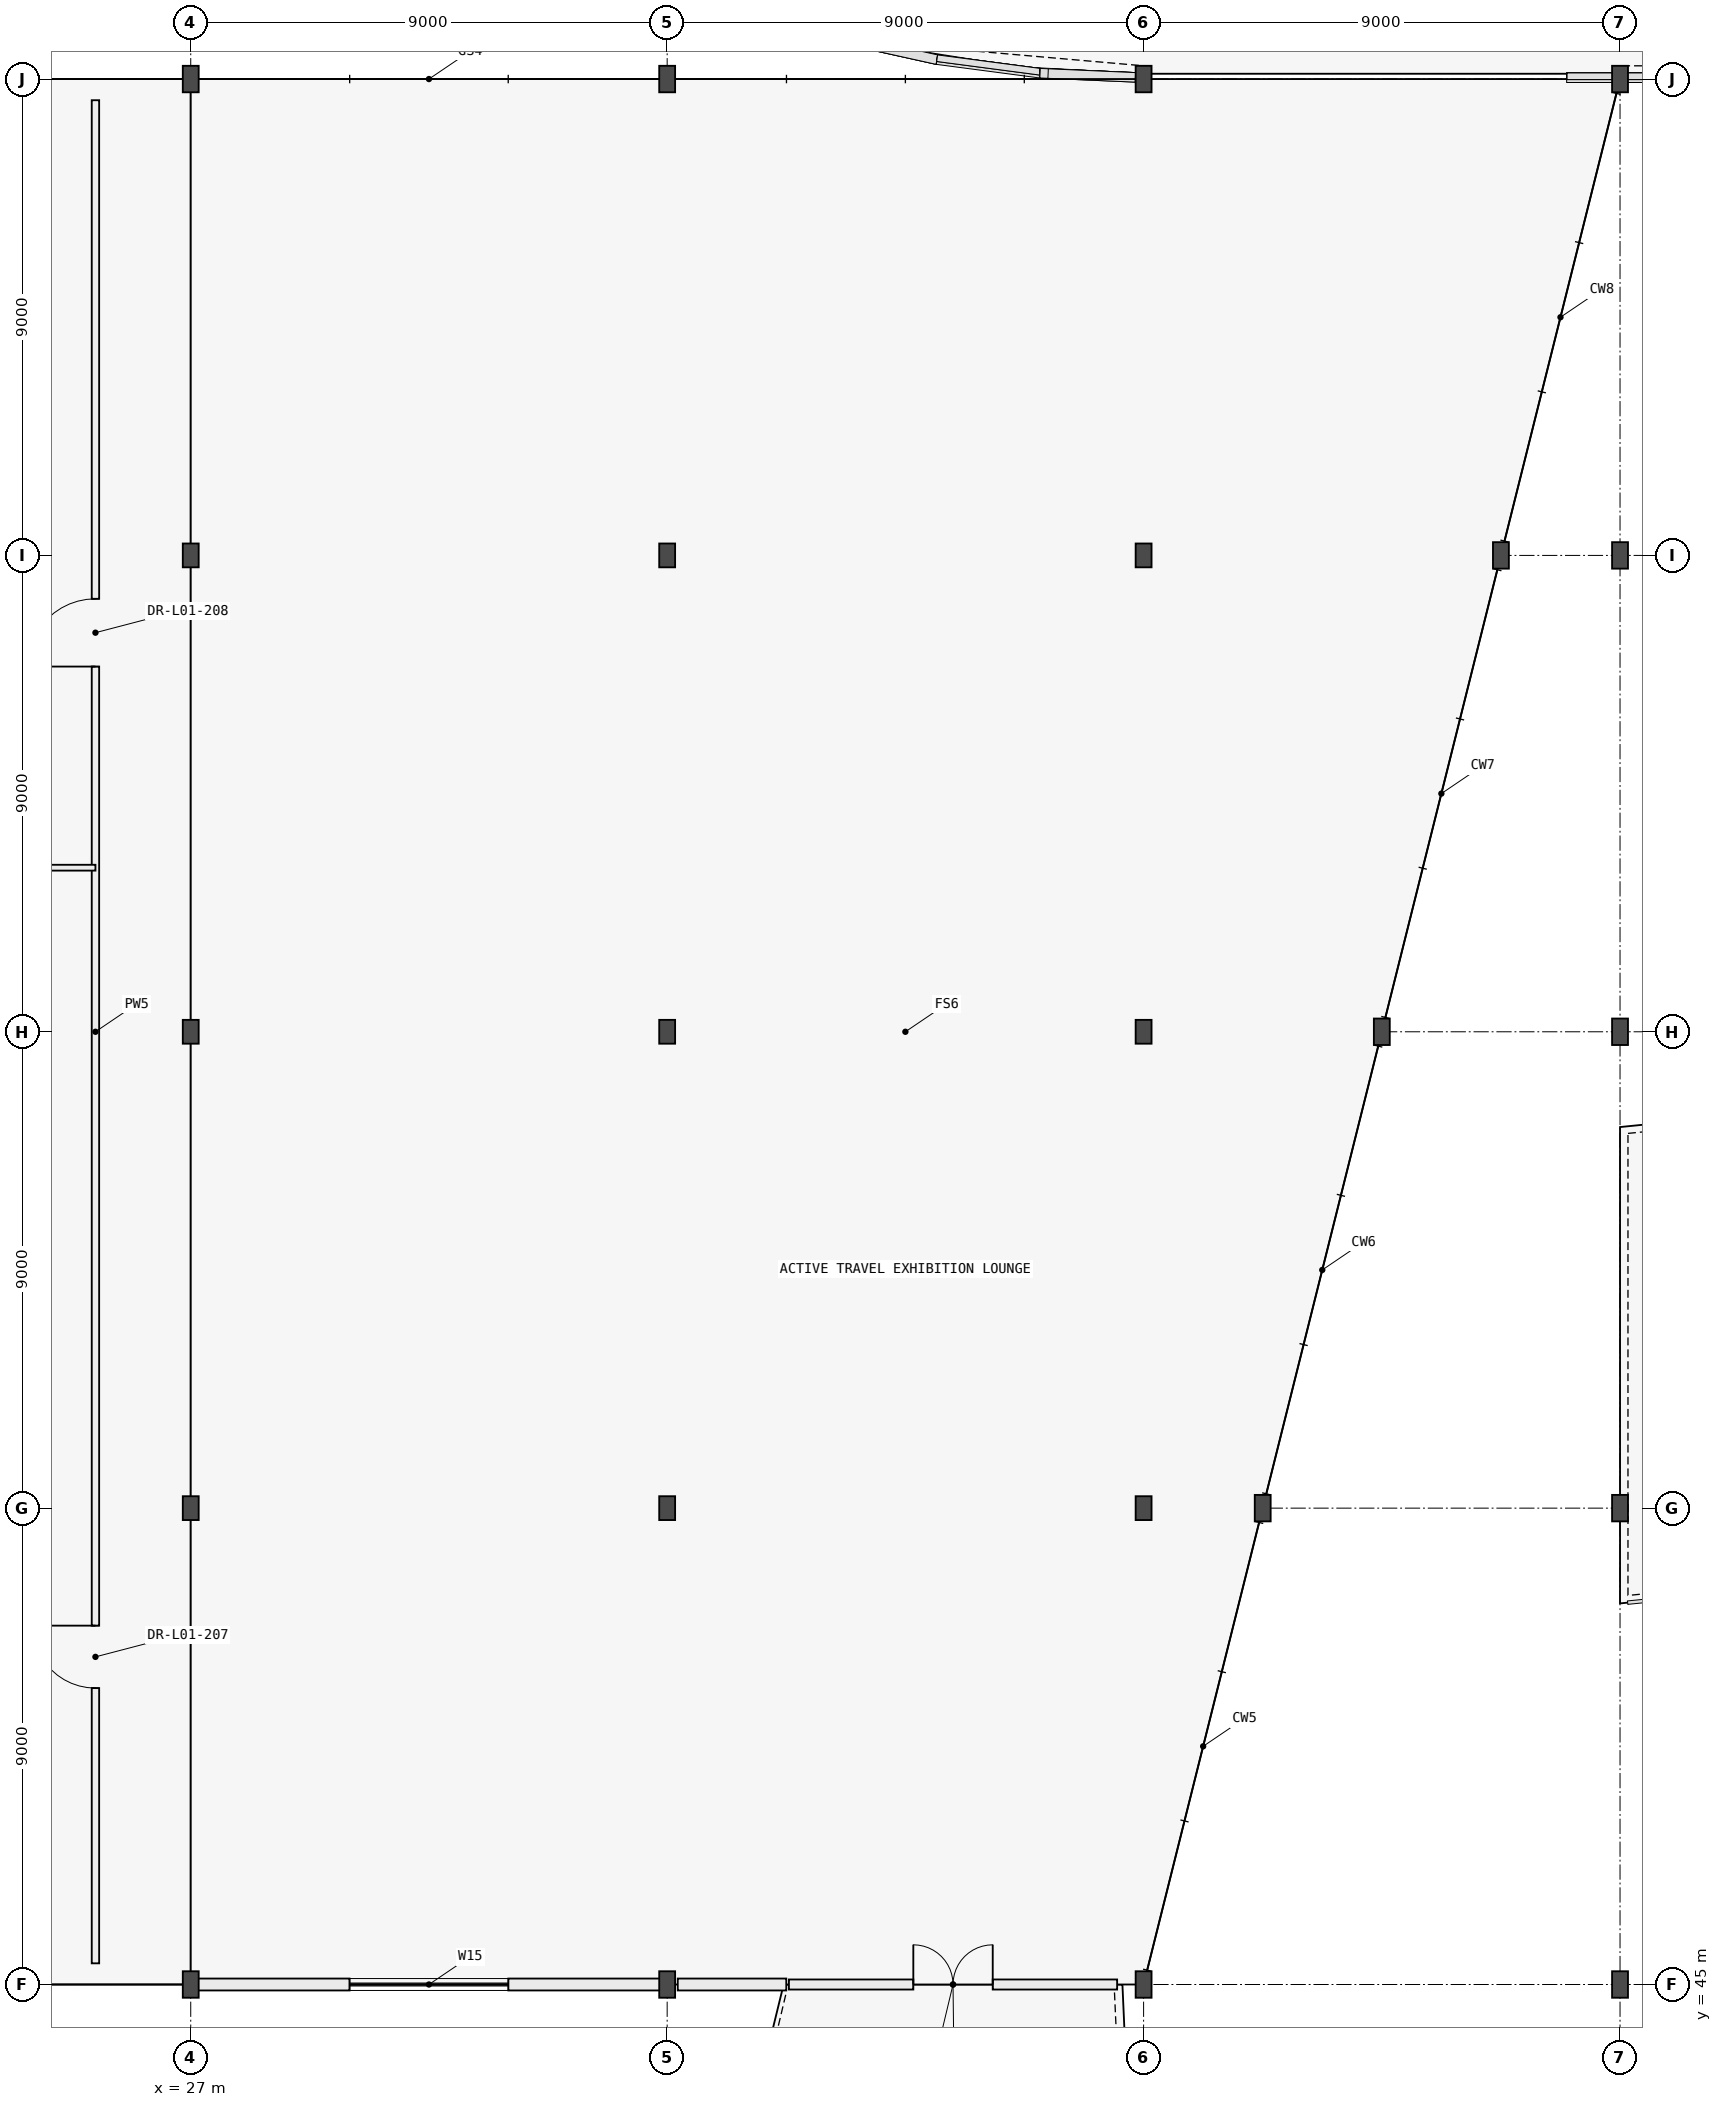
"""IFC4 building model, lengths in metres.
Left out: names, types, materials, properties, quantities, classifications, styles, units other than length and angle.
Written with IfcOpenShell. Run it as: python <this file> out.ifc"""

import sys

from ifc_helpers import new_model, si_unit, direction, frame, frame_2d, origin, origin_2d, place, context, subcontext, project, spatial, rectangle, i_section, extrude, element, fill, save


model = new_model("IFC4")
c1 = context("Model", 3, precision=1e-05, world=origin(), true_north=direction((0.0, 1.0)))
c2 = subcontext(c1, "Body", "Model", "MODEL_VIEW")
j1 = project(units=[si_unit("LENGTHUNIT", "METRE"), si_unit("PLANEANGLEUNIT", "RADIAN")], contexts=[c1])
p1 = place(None, origin())
s1 = spatial("IfcSite", under=j1, at=p1, CompositionType="ELEMENT")
p2 = place(p1, origin())
s2 = spatial("IfcBuilding", under=s1, at=p2, CompositionType="ELEMENT")
p3 = place(p2, frame((0.0, 0.0, 4.2)))
s3 = spatial("IfcBuildingStorey", under=s2, at=p3, CompositionType="ELEMENT", Elevation=4.2)
for number, where, z_axis, x_axis in (
    (1, (27.0, 45.0, 0.0), (0.0, 0.0, 1.0), (1.0, 0.0, 0.0)),
    (2, (36.0, 45.0, 0.0), (0.0, 0.0, 1.0), (1.0, 0.0, 0.0)),
    (3, (45.0, 45.0, 0.0), (0.0, 0.0, 1.0), (1.0, 0.0, 0.0)),
):
    element("IfcColumn", number, at=place(p3, frame(where, z_axis=z_axis, x_axis=x_axis)), inside=s3, PredefinedType="COLUMN", context=c2, shape_type="SweptSolid", body=[
        extrude(i_section(OverallWidth=0.3, OverallDepth=0.5, WebThickness=0.014, FlangeThickness=0.028, FilletRadius=0.027, at=origin_2d()), origin(), (0.0, 0.0, 1.0), 4.2),
    ])
for number, where, z_axis, x_axis in (
    (4, (27.0, 54.0, 0.0), (0.0, 0.0, 1.0), (1.0, 0.0, 0.0)),
    (5, (36.0, 54.0, 0.0), (0.0, 0.0, 1.0), (1.0, 0.0, 0.0)),
    (6, (45.0, 54.0, 0.0), (0.0, 0.0, 1.0), (1.0, 0.0, 0.0)),
):
    element("IfcColumn", number, at=place(p3, frame(where, z_axis=z_axis, x_axis=x_axis)), inside=s3, PredefinedType="COLUMN", context=c2, shape_type="SweptSolid", body=[
        extrude(i_section(OverallWidth=0.3, OverallDepth=0.45, WebThickness=0.014, FlangeThickness=0.026, FilletRadius=0.027, at=origin_2d()), origin(), (0.0, 0.0, 1.0), 4.2),
    ])
p4 = place(p3, frame((47.25, 54.0, 0.0), z_axis=(0.0, 0.0, 1.0), x_axis=(1.0, 0.0, 0.0)))
e7 = element("IfcColumn", 7, at=p4, inside=s3, PredefinedType="COLUMN", context=c2, shape_type="SweptSolid", body=[
    extrude(i_section(OverallWidth=0.3, OverallDepth=0.5, WebThickness=0.014, FlangeThickness=0.028, FilletRadius=0.027, at=origin_2d()), origin(), (0.0, 0.0, 1.0), 4.2),
])
for number, where, z_axis, x_axis in (
    (8, (27.0, 63.0, 0.0), (0.0, 0.0, 1.0), (1.0, 0.0, 0.0)),
    (9, (36.0, 63.0, 0.0), (0.0, 0.0, 1.0), (1.0, 0.0, 0.0)),
    (10, (45.0, 63.0, 0.0), (0.0, 0.0, 1.0), (1.0, 0.0, 0.0)),
):
    element("IfcColumn", number, at=place(p3, frame(where, z_axis=z_axis, x_axis=x_axis)), inside=s3, PredefinedType="COLUMN", context=c2, shape_type="SweptSolid", body=[
        extrude(i_section(OverallWidth=0.3, OverallDepth=0.45, WebThickness=0.014, FlangeThickness=0.026, FilletRadius=0.027, at=origin_2d()), origin(), (0.0, 0.0, 1.0), 4.2),
    ])
p5 = place(p3, frame((49.5, 63.0, 0.0), z_axis=(0.0, 0.0, 1.0), x_axis=(1.0, 0.0, 0.0)))
e11 = element("IfcColumn", 11, at=p5, inside=s3, PredefinedType="COLUMN", context=c2, shape_type="SweptSolid", body=[
    extrude(i_section(OverallWidth=0.3, OverallDepth=0.5, WebThickness=0.014, FlangeThickness=0.028, FilletRadius=0.027, at=origin_2d()), origin(), (0.0, 0.0, 1.0), 4.2),
])
for number, where, z_axis, x_axis in (
    (12, (27.0, 72.0, 0.0), (0.0, 0.0, 1.0), (1.0, 0.0, 0.0)),
    (13, (36.0, 72.0, 0.0), (0.0, 0.0, 1.0), (1.0, 0.0, 0.0)),
    (14, (45.0, 72.0, 0.0), (0.0, 0.0, 1.0), (1.0, 0.0, 0.0)),
):
    element("IfcColumn", number, at=place(p3, frame(where, z_axis=z_axis, x_axis=x_axis)), inside=s3, PredefinedType="COLUMN", context=c2, shape_type="SweptSolid", body=[
        extrude(i_section(OverallWidth=0.3, OverallDepth=0.45, WebThickness=0.014, FlangeThickness=0.026, FilletRadius=0.027, at=origin_2d()), origin(), (0.0, 0.0, 1.0), 4.2),
    ])
for number, where, z_axis, x_axis in (
    (15, (51.75, 72.0, 0.0), (0.0, 0.0, 1.0), (1.0, 0.0, 0.0)),
    (16, (27.0, 81.0, 0.0), (0.0, 0.0, 1.0), (1.0, 0.0, 0.0)),
    (17, (36.0, 81.0, 0.0), (0.0, 0.0, 1.0), (1.0, 0.0, 0.0)),
    (18, (45.0, 81.0, 0.0), (0.0, 0.0, 1.0), (1.0, 0.0, 0.0)),
    (19, (54.0, 81.0, 0.0), (0.0, 0.0, 1.0), (1.0, 0.0, 0.0)),
    (20, (54.0, 54.0, 0.0), (0.0, 0.0, 1.0), (1.0, 0.0, 0.0)),
    (21, (54.0, 63.0, 0.0), (0.0, 0.0, 1.0), (1.0, 0.0, 0.0)),
    (22, (54.0, 45.0, 0.0), (0.0, 0.0, 1.0), (1.0, 0.0, 0.0)),
    (23, (54.0, 72.0, 0.0), (0.0, 0.0, 1.0), (1.0, 0.0, 0.0)),
):
    element("IfcColumn", number, at=place(p3, frame(where, z_axis=z_axis, x_axis=x_axis)), inside=s3, PredefinedType="COLUMN", context=c2, shape_type="SweptSolid", body=[
        extrude(i_section(OverallWidth=0.3, OverallDepth=0.5, WebThickness=0.014, FlangeThickness=0.028, FilletRadius=0.027, at=origin_2d()), origin(), (0.0, 0.0, 1.0), 4.2),
    ])
p6 = place(p3, frame((27.007, 45.0, 0.0), z_axis=(0.0, 0.0, 1.0), x_axis=(1.0, 0.0, 0.0)))
e24 = element("IfcWall", 24, at=p6, inside=s3, PredefinedType="STANDARD", context=c2, shape_type="SweptSolid", body=[
    extrude(rectangle(XDim=8.986, YDim=0.225, at=frame_2d((4.493, 0.0))), origin(), (0.0, 0.0, 1.0), 3.945),
])
p7 = place(p6, frame((2.993, 0.0, 0.95)))
e25 = element("IfcOpeningElement", 25, at=p7, cuts=e24, PredefinedType="OPENING", context=c2, shape_type="SweptSolid", body=[
    extrude(rectangle(XDim=3.0, YDim=1.8, at=frame_2d((1.5, 0.9))), frame((0.0, 0.123, 0.0), z_axis=(0.0, -1.0, 0.0), x_axis=(1.0, 0.0, 0.0)), (0.0, 0.0, 1.0), 0.245),
])
p8 = place(p3, frame((36.2, 45.0, 0.0), z_axis=(0.0, 0.0, 1.0), x_axis=(1.0, 0.0, 0.0)))
e26 = element("IfcWall", 26, at=p8, inside=s3, PredefinedType="STANDARD", context=c2, shape_type="SweptSolid", body=[
    extrude(rectangle(XDim=2.05, YDim=0.225, at=frame_2d((1.025, 0.0))), origin(), (0.0, 0.0, 1.0), 3.945),
])
p9 = place(p3, frame((25.2, 45.4, 0.0), z_axis=(0.0, 0.0, 1.0), x_axis=(0.0, 1.0, 0.0)))
e27 = element("IfcWall", 27, at=p9, inside=s3, PredefinedType="PARTITIONING", context=c2, shape_type="SweptSolid", body=[
    extrude(rectangle(XDim=35.2, YDim=0.14, at=frame_2d((17.6, 0.0))), origin(), (0.0, 0.0, 1.0), 3.945),
])
p10 = place(p9, frame((5.2, 0.0, 0.0)))
e28 = element("IfcOpeningElement", 28, at=p10, cuts=e27, PredefinedType="OPENING", context=c2, shape_type="SweptSolid", body=[
    extrude(rectangle(XDim=1.18, YDim=2.15, at=frame_2d((0.59, 1.075))), frame((0.0, 0.08, 0.0), z_axis=(0.0, -1.0, 0.0), x_axis=(1.0, 0.0, 0.0)), (0.0, 0.0, 1.0), 0.16),
])
p11 = place(p9, frame((24.5, 0.0, 0.0)))
e29 = element("IfcOpeningElement", 29, at=p11, cuts=e27, PredefinedType="OPENING", context=c2, shape_type="SweptSolid", body=[
    extrude(rectangle(XDim=1.28, YDim=2.18, at=frame_2d((0.64, 1.09))), frame((0.0, 0.08, 0.0), z_axis=(0.0, -1.0, 0.0), x_axis=(1.0, 0.0, 0.0)), (0.0, 0.0, 1.0), 0.16),
])
p12 = place(p3, frame((0.4, 66.1, 0.0), z_axis=(0.0, 0.0, 1.0), x_axis=(1.0, 0.0, 0.0)))
e30 = element("IfcWall", 30, at=p12, inside=s3, PredefinedType="PARTITIONING", context=c2, shape_type="SweptSolid", body=[
    extrude(rectangle(XDim=24.8, YDim=0.11, at=frame_2d((12.4, 0.0))), origin(), (0.0, 0.0, 1.0), 3.945),
])
p13 = place(p12, frame((5.8, 0.0, 0.0)))
e31 = element("IfcOpeningElement", 31, at=p13, cuts=e30, PredefinedType="OPENING", context=c2, shape_type="SweptSolid", body=[
    extrude(rectangle(XDim=1.38, YDim=2.2, at=frame_2d((0.69, 1.1))), frame((0.0, 0.065, 0.0), z_axis=(0.0, -1.0, 0.0), x_axis=(1.0, 0.0, 0.0)), (0.0, 0.0, 1.0), 0.13),
])
p14 = place(p3, frame((38.3, 45.0, 0.0), z_axis=(0.0, 0.0, 1.0), x_axis=(1.0, 0.0, 0.0)))
e32 = element("IfcWall", 32, at=p14, inside=s3, PredefinedType="PARTITIONING", context=c2, shape_type="SweptSolid", body=[
    extrude(rectangle(XDim=6.2, YDim=0.19, at=frame_2d((3.1, 0.0))), origin(), (0.0, 0.0, 1.0), 3.945),
])
p15 = place(p14, frame((2.35, 0.0, 0.0)))
e33 = element("IfcOpeningElement", 33, at=p15, cuts=e32, PredefinedType="OPENING", context=c2, shape_type="SweptSolid", body=[
    extrude(rectangle(XDim=1.5, YDim=2.2, at=frame_2d((0.75, 1.1))), frame((0.0, 0.105, 0.0), z_axis=(0.0, -1.0, 0.0), x_axis=(1.0, 0.0, 0.0)), (0.0, 0.0, 1.0), 0.21),
])
p16 = place(p7, origin())
e34 = element("IfcWindow", 34, at=p16, inside=s3, PartitioningType="SINGLE_PANEL", PredefinedType="WINDOW", context=c2, shape_type="SweptSolid", body=[
    extrude(rectangle(XDim=3.0, YDim=1.8, at=frame_2d((1.5, 0.9))), frame((0.0, 0.03, 0.0), z_axis=(0.0, -1.0, 0.0), x_axis=(1.0, 0.0, 0.0)), (0.0, 0.0, 1.0), 0.06),
])
fill(e25, e34)
p17 = place(p10, origin())
e35 = element("IfcDoor", 35, at=p17, inside=s3, OperationType="SINGLE_SWING_RIGHT", PredefinedType="DOOR", context=c2, shape_type="SweptSolid", body=[
    extrude(rectangle(XDim=1.18, YDim=2.15, at=frame_2d((0.59, 1.075))), frame((0.0, 0.025, 0.0), z_axis=(0.0, -1.0, 0.0), x_axis=(1.0, 0.0, 0.0)), (0.0, 0.0, 1.0), 0.05),
])
fill(e28, e35)
p18 = place(p11, origin())
e36 = element("IfcDoor", 36, at=p18, inside=s3, OperationType="SINGLE_SWING_LEFT", PredefinedType="DOOR", context=c2, shape_type="SweptSolid", body=[
    extrude(rectangle(XDim=1.28, YDim=2.18, at=frame_2d((0.64, 1.09))), frame((0.0, 0.025, 0.0), z_axis=(0.0, -1.0, 0.0), x_axis=(1.0, 0.0, 0.0)), (0.0, 0.0, 1.0), 0.05),
])
fill(e29, e36)
p19 = place(p15, origin())
e37 = element("IfcDoor", 37, at=p19, inside=s3, OperationType="DOUBLE_DOOR_SINGLE_SWING", PredefinedType="DOOR", context=c2, shape_type="SweptSolid", body=[
    extrude(rectangle(XDim=1.5, YDim=2.2, at=frame_2d((0.75, 1.1))), frame((0.0, 0.025, 0.0), z_axis=(0.0, -1.0, 0.0), x_axis=(1.0, 0.0, 0.0)), (0.0, 0.0, 1.0), 0.05),
])
fill(e33, e37)
save(model, sys.argv[1])
